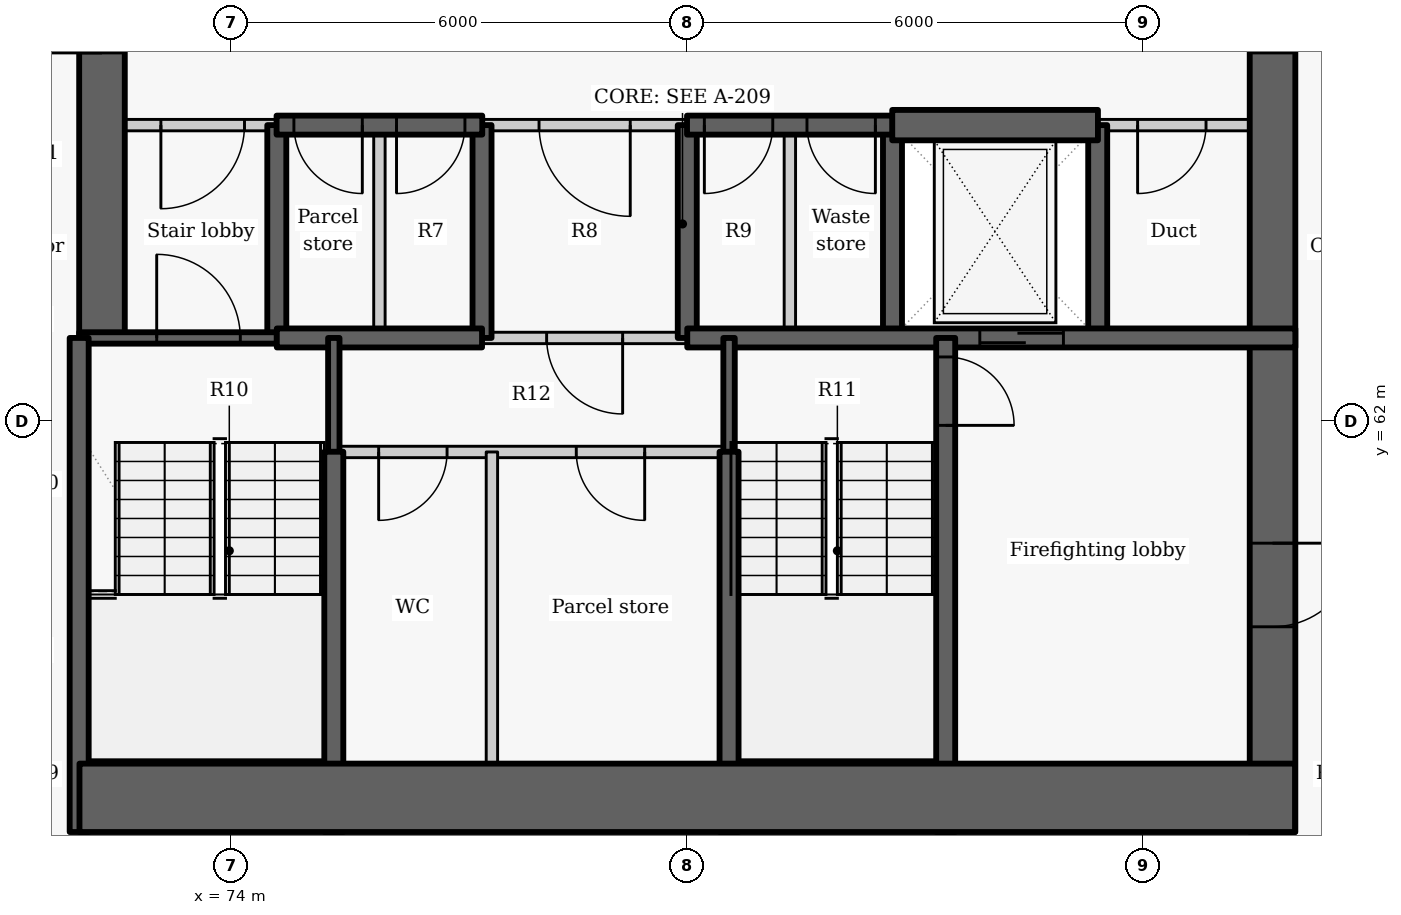
"""IFC4 building model, lengths in metres.
Left out: names, types, materials, properties, quantities, classifications, styles, units other than length and angle.
Written with IfcOpenShell. Run it as: python <this file> out.ifc"""

import sys

from ifc_helpers import new_model, si_unit, direction, frame, frame_2d, origin, place, context, subcontext, project, spatial, rectangle, extrude, element, fill, save


model = new_model("IFC4")
c1 = context("Model", 3, precision=1e-05, world=origin(), true_north=direction((0.0, 1.0)))
c2 = subcontext(c1, "Body", "Model", "MODEL_VIEW")
j1 = project(units=[si_unit("LENGTHUNIT", "METRE"), si_unit("PLANEANGLEUNIT", "RADIAN")], contexts=[c1])
p1 = place(None, origin())
s1 = spatial("IfcSite", under=j1, at=p1, CompositionType="ELEMENT")
p2 = place(p1, origin())
s2 = spatial("IfcBuilding", under=s1, at=p2, CompositionType="ELEMENT")
p3 = place(p2, frame((0.0, 0.0, 34.8)))
s3 = spatial("IfcBuildingStorey", under=s2, at=p3, CompositionType="ELEMENT", Elevation=34.8)
p4 = place(p3, frame((74.6, 63.1, -0.275), z_axis=(0.0, 0.0, 1.0), x_axis=(0.0, 1.0, 0.0)))
e1 = element("IfcWall", 1, at=p4, inside=s3, PredefinedType="SHEAR", context=c2, shape_type="SweptSolid", body=[
    extrude(rectangle(XDim=2.8, YDim=0.25, at=frame_2d((1.4, 0.0))), origin(), (0.0, 0.0, 1.0), 3.175),
])
p5 = place(p3, frame((72.3, 63.1, -0.275), z_axis=(0.0, 0.0, 1.0), x_axis=(0.0, 1.0, 0.0)))
e2 = element("IfcWall", 2, at=p5, inside=s3, PredefinedType="SHEAR", context=c2, shape_type="SweptSolid", body=[
    extrude(rectangle(XDim=9.1, YDim=0.6, at=frame_2d((4.55, 0.0))), origin(), (0.0, 0.0, 1.0), 3.175),
])
p6 = place(p5, frame((3.75, 0.0, 0.275)))
e3 = element("IfcOpeningElement", 3, at=p6, cuts=e2, PredefinedType="OPENING", context=c2, shape_type="SweptSolid", body=[
    extrude(rectangle(XDim=1.5, YDim=2.1, at=frame_2d((0.75, 1.05))), frame((0.0, 0.31, 0.0), z_axis=(0.0, -1.0, 0.0), x_axis=(1.0, 0.0, 0.0)), (0.0, 0.0, 1.0), 0.62),
])
for number, where, z_axis, x_axis in (
    (4, (77.3, 63.1, -0.275), (0.0, 0.0, 1.0), (0.0, 1.0, 0.0)),
    (5, (80.0, 63.1, -0.275), (0.0, 0.0, 1.0), (0.0, 1.0, 0.0)),
    (6, (82.7, 63.1, -0.275), (0.0, 0.0, 1.0), (0.0, 1.0, 0.0)),
    (7, (85.4, 63.1, -0.275), (0.0, 0.0, 1.0), (0.0, 1.0, 0.0)),
):
    element("IfcWall", number, at=place(p3, frame(where, z_axis=z_axis, x_axis=x_axis)), inside=s3, PredefinedType="SHEAR", context=c2, shape_type="SweptSolid", body=[
        extrude(rectangle(XDim=2.8, YDim=0.25, at=frame_2d((1.4, 0.0))), origin(), (0.0, 0.0, 1.0), 3.175),
    ])
p7 = place(p3, frame((87.7, 72.2, -0.275), z_axis=(0.0, 0.0, 1.0), x_axis=(0.0, -1.0, 0.0)))
e8 = element("IfcWall", 8, at=p7, inside=s3, PredefinedType="SHEAR", context=c2, shape_type="SweptSolid", body=[
    extrude(rectangle(XDim=15.6, YDim=0.6, at=frame_2d((7.8, 0.0))), origin(), (0.0, 0.0, 1.0), 3.175),
])
p8 = place(p7, frame((3.85, 0.0, 0.275)))
e9 = element("IfcOpeningElement", 9, at=p8, cuts=e8, PredefinedType="OPENING", context=c2, shape_type="SweptSolid", body=[
    extrude(rectangle(XDim=1.5, YDim=2.1, at=frame_2d((0.75, 1.05))), frame((0.0, 0.31, 0.0), z_axis=(0.0, -1.0, 0.0), x_axis=(1.0, 0.0, 0.0)), (0.0, 0.0, 1.0), 0.62),
])
p9 = place(p7, frame((11.8, 0.0, 0.275)))
e10 = element("IfcOpeningElement", 10, at=p9, cuts=e8, PredefinedType="OPENING", context=c2, shape_type="SweptSolid", body=[
    extrude(rectangle(XDim=1.1, YDim=2.1, at=frame_2d((0.55, 1.05))), frame((0.0, 0.31, 0.0), z_axis=(0.0, -1.0, 0.0), x_axis=(1.0, 0.0, 0.0)), (0.0, 0.0, 1.0), 0.62),
])
p10 = place(p3, frame((74.603, 65.9, 0.0), z_axis=(0.0, 0.0, 1.0), x_axis=(-1.0, 0.0, 0.0)))
e11 = element("IfcWall", 11, at=p10, inside=s3, PredefinedType="PARTITIONING", context=c2, shape_type="SweptSolid", body=[
    extrude(rectangle(XDim=2.603, YDim=0.15, at=frame_2d((1.302, 0.0))), origin(), (0.0, 0.0, 1.0), 2.9),
])
p11 = place(p10, frame((0.428, 0.0, 0.0)))
e12 = element("IfcOpeningElement", 12, at=p11, cuts=e11, PredefinedType="OPENING", context=c2, shape_type="SweptSolid", body=[
    extrude(rectangle(XDim=1.1, YDim=2.1, at=frame_2d((0.55, 1.05))), frame((0.0, 0.085, 0.0), z_axis=(0.0, -1.0, 0.0), x_axis=(1.0, 0.0, 0.0)), (0.0, 0.0, 1.0), 0.17),
])
p12 = place(p3, frame((80.003, 65.9, 0.0), z_axis=(0.0, 0.0, 1.0), x_axis=(-1.0, 0.0, 0.0)))
e13 = element("IfcWall", 13, at=p12, inside=s3, PredefinedType="PARTITIONING", context=c2, shape_type="SweptSolid", body=[
    extrude(rectangle(XDim=2.706, YDim=0.15, at=frame_2d((1.353, 0.0))), origin(), (0.0, 0.0, 1.0), 2.9),
])
p13 = place(p12, frame((0.753, 0.0, 0.0)))
e14 = element("IfcOpeningElement", 14, at=p13, cuts=e13, PredefinedType="OPENING", context=c2, shape_type="SweptSolid", body=[
    extrude(rectangle(XDim=1.2, YDim=2.1, at=frame_2d((0.6, 1.05))), frame((0.0, 0.085, 0.0), z_axis=(0.0, -1.0, 0.0), x_axis=(1.0, 0.0, 0.0)), (0.0, 0.0, 1.0), 0.17),
])
p14 = place(p3, frame((88.0, 65.9, 0.0), z_axis=(0.0, 0.0, 1.0), x_axis=(-1.0, 0.0, 0.0)))
e15 = element("IfcWall", 15, at=p14, inside=s3, PredefinedType="PARTITIONING", context=c2, shape_type="SweptSolid", body=[
    extrude(rectangle(XDim=2.603, YDim=0.15, at=frame_2d((1.302, 0.0))), origin(), (0.0, 0.0, 1.0), 2.9),
])
p15 = place(p14, frame((1.175, 0.0, 0.0)))
e16 = element("IfcOpeningElement", 16, at=p15, cuts=e15, PredefinedType="OPENING", context=c2, shape_type="SweptSolid", body=[
    extrude(rectangle(XDim=0.9, YDim=2.1, at=frame_2d((0.45, 1.05))), frame((0.0, 0.085, 0.0), z_axis=(0.0, -1.0, 0.0), x_axis=(1.0, 0.0, 0.0)), (0.0, 0.0, 1.0), 0.17),
])
p16 = place(p3, frame((77.303, 65.9, -0.275), z_axis=(0.0, 0.0, 1.0), x_axis=(-1.0, 0.0, 0.0)))
e17 = element("IfcWall", 17, at=p16, inside=s3, PredefinedType="SHEAR", context=c2, shape_type="SweptSolid", body=[
    extrude(rectangle(XDim=2.706, YDim=0.25, at=frame_2d((1.353, 0.0))), origin(), (0.0, 0.0, 1.0), 3.175),
])
p17 = place(p16, frame((1.578, 0.0, 0.275)))
e18 = element("IfcOpeningElement", 18, at=p17, cuts=e17, PredefinedType="OPENING", context=c2, shape_type="SweptSolid", body=[
    extrude(rectangle(XDim=0.9, YDim=2.1, at=frame_2d((0.45, 1.05))), frame((0.0, 0.135, 0.0), z_axis=(0.0, -1.0, 0.0), x_axis=(1.0, 0.0, 0.0)), (0.0, 0.0, 1.0), 0.27),
])
p18 = place(p16, frame((0.228, 0.0, 0.275)))
e19 = element("IfcOpeningElement", 19, at=p18, cuts=e17, PredefinedType="OPENING", context=c2, shape_type="SweptSolid", body=[
    extrude(rectangle(XDim=0.9, YDim=2.1, at=frame_2d((0.45, 1.05))), frame((0.0, 0.135, 0.0), z_axis=(0.0, -1.0, 0.0), x_axis=(1.0, 0.0, 0.0)), (0.0, 0.0, 1.0), 0.27),
])
p19 = place(p3, frame((82.703, 65.9, -0.275), z_axis=(0.0, 0.0, 1.0), x_axis=(-1.0, 0.0, 0.0)))
e20 = element("IfcWall", 20, at=p19, inside=s3, PredefinedType="SHEAR", context=c2, shape_type="SweptSolid", body=[
    extrude(rectangle(XDim=2.706, YDim=0.25, at=frame_2d((1.353, 0.0))), origin(), (0.0, 0.0, 1.0), 3.175),
])
p20 = place(p19, frame((1.578, 0.0, 0.275)))
e21 = element("IfcOpeningElement", 21, at=p20, cuts=e20, PredefinedType="OPENING", context=c2, shape_type="SweptSolid", body=[
    extrude(rectangle(XDim=0.9, YDim=2.1, at=frame_2d((0.45, 1.05))), frame((0.0, 0.135, 0.0), z_axis=(0.0, -1.0, 0.0), x_axis=(1.0, 0.0, 0.0)), (0.0, 0.0, 1.0), 0.27),
])
p21 = place(p19, frame((0.228, 0.0, 0.275)))
e22 = element("IfcOpeningElement", 22, at=p21, cuts=e20, PredefinedType="OPENING", context=c2, shape_type="SweptSolid", body=[
    extrude(rectangle(XDim=0.9, YDim=2.1, at=frame_2d((0.45, 1.05))), frame((0.0, 0.135, 0.0), z_axis=(0.0, -1.0, 0.0), x_axis=(1.0, 0.0, 0.0)), (0.0, 0.0, 1.0), 0.27),
])
p22 = place(p3, frame((82.697, 65.9, -0.275), z_axis=(0.0, 0.0, 1.0), x_axis=(1.0, 0.0, 0.0)))
e23 = element("IfcWall", 23, at=p22, inside=s3, PredefinedType="SHEAR", context=c2, shape_type="SweptSolid", body=[
    extrude(rectangle(XDim=2.706, YDim=0.4, at=frame_2d((1.353, 0.0))), origin(), (0.0, 0.0, 1.0), 3.175),
])
p23 = place(p3, frame((72.0, 63.1, -0.275), z_axis=(0.0, 0.0, 1.0), x_axis=(1.0, 0.0, 0.0)))
e24 = element("IfcWall", 24, at=p23, inside=s3, PredefinedType="SHEAR", context=c2, shape_type="SweptSolid", body=[
    extrude(rectangle(XDim=2.6, YDim=0.15, at=frame_2d((1.3, 0.0))), origin(), (0.0, 0.0, 1.0), 3.175),
])
p24 = place(p23, frame((1.02, 0.0, 0.275)))
e25 = element("IfcOpeningElement", 25, at=p24, cuts=e24, PredefinedType="OPENING", context=c2, shape_type="SweptSolid", body=[
    extrude(rectangle(XDim=1.1, YDim=2.1, at=frame_2d((0.55, 1.05))), frame((0.0, 0.085, 0.0), z_axis=(0.0, -1.0, 0.0), x_axis=(1.0, 0.0, 0.0)), (0.0, 0.0, 1.0), 0.17),
])
p25 = place(p3, frame((75.95, 63.1, 0.0), z_axis=(0.0, 0.0, 1.0), x_axis=(0.0, 1.0, 0.0)))
e26 = element("IfcWall", 26, at=p25, inside=s3, PredefinedType="PARTITIONING", context=c2, shape_type="SweptSolid", body=[
    extrude(rectangle(XDim=2.8, YDim=0.15, at=frame_2d((1.4, 0.0))), origin(), (0.0, 0.0, 1.0), 2.9),
])
p26 = place(p3, frame((74.6, 63.1, -0.275), z_axis=(0.0, 0.0, 1.0), x_axis=(1.0, 0.0, 0.0)))
e27 = element("IfcWall", 27, at=p26, inside=s3, PredefinedType="SHEAR", context=c2, shape_type="SweptSolid", body=[
    extrude(rectangle(XDim=2.7, YDim=0.25, at=frame_2d((1.35, 0.0))), origin(), (0.0, 0.0, 1.0), 3.175),
])
p27 = place(p3, frame((80.0, 63.1, -0.275), z_axis=(0.0, 0.0, 1.0), x_axis=(1.0, 0.0, 0.0)))
e28 = element("IfcWall", 28, at=p27, inside=s3, PredefinedType="SHEAR", context=c2, shape_type="SweptSolid", body=[
    extrude(rectangle(XDim=8.0, YDim=0.25, at=frame_2d((4.0, 0.0))), origin(), (0.0, 0.0, 1.0), 3.175),
])
p28 = place(p27, frame((3.849, 0.0, 0.275)))
e29 = element("IfcOpeningElement", 29, at=p28, cuts=e28, PredefinedType="OPENING", context=c2, shape_type="SweptSolid", body=[
    extrude(rectangle(XDim=1.1, YDim=2.1, at=frame_2d((0.55, 1.05))), frame((0.0, 0.135, 0.0), z_axis=(0.0, -1.0, 0.0), x_axis=(1.0, 0.0, 0.0)), (0.0, 0.0, 1.0), 0.27),
])
p29 = place(p3, frame((80.0, 63.1, 0.0), z_axis=(0.0, 0.0, 1.0), x_axis=(-1.0, 0.0, 0.0)))
e30 = element("IfcWall", 30, at=p29, inside=s3, PredefinedType="PARTITIONING", context=c2, shape_type="SweptSolid", body=[
    extrude(rectangle(XDim=2.7, YDim=0.15, at=frame_2d((1.35, 0.0))), origin(), (0.0, 0.0, 1.0), 2.9),
])
p30 = place(p29, frame((0.85, 0.0, 0.0)))
e31 = element("IfcOpeningElement", 31, at=p30, cuts=e30, PredefinedType="OPENING", context=c2, shape_type="SweptSolid", body=[
    extrude(rectangle(XDim=1.0, YDim=2.1, at=frame_2d((0.5, 1.05))), frame((0.0, 0.085, 0.0), z_axis=(0.0, -1.0, 0.0), x_axis=(1.0, 0.0, 0.0)), (0.0, 0.0, 1.0), 0.17),
])
p31 = place(p3, frame((81.35, 63.1, 0.0), z_axis=(0.0, 0.0, 1.0), x_axis=(0.0, 1.0, 0.0)))
e32 = element("IfcWall", 32, at=p31, inside=s3, PredefinedType="PARTITIONING", context=c2, shape_type="SweptSolid", body=[
    extrude(rectangle(XDim=2.8, YDim=0.15, at=frame_2d((1.4, 0.0))), origin(), (0.0, 0.0, 1.0), 2.9),
])
p32 = place(p3, frame((75.35, 61.597, -0.275), z_axis=(0.0, 0.0, 1.0), x_axis=(0.0, 1.0, 0.0)))
e33 = element("IfcWall", 33, at=p32, inside=s3, PredefinedType="SHEAR", context=c2, shape_type="SweptSolid", body=[
    extrude(rectangle(XDim=1.503, YDim=0.15, at=frame_2d((0.751, 0.0))), origin(), (0.0, 0.0, 1.0), 3.175),
])
p33 = place(p3, frame((75.35, 56.6, -0.275), z_axis=(0.0, 0.0, 1.0), x_axis=(0.0, 1.0, 0.0)))
e34 = element("IfcWall", 34, at=p33, inside=s3, PredefinedType="SHEAR", context=c2, shape_type="SweptSolid", body=[
    extrude(rectangle(XDim=5.003, YDim=0.25, at=frame_2d((2.501, 0.0))), origin(), (0.0, 0.0, 1.0), 3.175),
])
p34 = place(p3, frame((72.0, 56.6, -0.275), z_axis=(0.0, 0.0, 1.0), x_axis=(0.0, 1.0, 0.0)))
e35 = element("IfcWall", 35, at=p34, inside=s3, PredefinedType="SHEAR", context=c2, shape_type="SweptSolid", body=[
    extrude(rectangle(XDim=6.5, YDim=0.25, at=frame_2d((3.25, 0.0))), origin(), (0.0, 0.0, 1.0), 3.175),
])
p35 = place(p3, frame((83.4, 63.1, -0.275), z_axis=(0.0, 0.0, 1.0), x_axis=(0.0, -1.0, 0.0)))
e36 = element("IfcWall", 36, at=p35, inside=s3, PredefinedType="SHEAR", context=c2, shape_type="SweptSolid", body=[
    extrude(rectangle(XDim=6.5, YDim=0.25, at=frame_2d((3.25, 0.0))), origin(), (0.0, 0.0, 1.0), 3.175),
])
p36 = place(p35, frame((0.25, 0.0, 0.275)))
e37 = element("IfcOpeningElement", 37, at=p36, cuts=e36, PredefinedType="OPENING", context=c2, shape_type="SweptSolid", body=[
    extrude(rectangle(XDim=0.9, YDim=2.1, at=frame_2d((0.45, 1.05))), frame((0.0, 0.135, 0.0), z_axis=(0.0, -1.0, 0.0), x_axis=(1.0, 0.0, 0.0)), (0.0, 0.0, 1.0), 0.27),
])
p37 = place(p3, frame((80.55, 61.597, -0.275), z_axis=(0.0, 0.0, 1.0), x_axis=(0.0, 1.0, 0.0)))
e38 = element("IfcWall", 38, at=p37, inside=s3, PredefinedType="SHEAR", context=c2, shape_type="SweptSolid", body=[
    extrude(rectangle(XDim=1.503, YDim=0.15, at=frame_2d((0.751, 0.0))), origin(), (0.0, 0.0, 1.0), 3.175),
])
p38 = place(p3, frame((80.55, 56.6, -0.275), z_axis=(0.0, 0.0, 1.0), x_axis=(0.0, 1.0, 0.0)))
e39 = element("IfcWall", 39, at=p38, inside=s3, PredefinedType="SHEAR", context=c2, shape_type="SweptSolid", body=[
    extrude(rectangle(XDim=5.003, YDim=0.25, at=frame_2d((2.501, 0.0))), origin(), (0.0, 0.0, 1.0), 3.175),
])
p39 = place(p3, frame((80.55, 61.6, 0.0), z_axis=(0.0, 0.0, 1.0), x_axis=(-1.0, 0.0, 0.0)))
e40 = element("IfcWall", 40, at=p39, inside=s3, PredefinedType="PARTITIONING", context=c2, shape_type="SweptSolid", body=[
    extrude(rectangle(XDim=5.2, YDim=0.15, at=frame_2d((2.6, 0.0))), origin(), (0.0, 0.0, 1.0), 2.9),
])
p40 = place(p39, frame((3.71, 0.0, 0.0)))
e41 = element("IfcOpeningElement", 41, at=p40, cuts=e40, PredefinedType="OPENING", context=c2, shape_type="SweptSolid", body=[
    extrude(rectangle(XDim=0.9, YDim=2.1, at=frame_2d((0.45, 1.05))), frame((0.0, 0.085, 0.0), z_axis=(0.0, -1.0, 0.0), x_axis=(1.0, 0.0, 0.0)), (0.0, 0.0, 1.0), 0.17),
])
p41 = place(p39, frame((1.11, 0.0, 0.0)))
e42 = element("IfcOpeningElement", 42, at=p41, cuts=e40, PredefinedType="OPENING", context=c2, shape_type="SweptSolid", body=[
    extrude(rectangle(XDim=0.9, YDim=2.1, at=frame_2d((0.45, 1.05))), frame((0.0, 0.085, 0.0), z_axis=(0.0, -1.0, 0.0), x_axis=(1.0, 0.0, 0.0)), (0.0, 0.0, 1.0), 0.17),
])
p42 = place(p3, frame((77.43, 56.6, 0.0), z_axis=(0.0, 0.0, 1.0), x_axis=(0.0, 1.0, 0.0)))
e43 = element("IfcWall", 43, at=p42, inside=s3, PredefinedType="PARTITIONING", context=c2, shape_type="SweptSolid", body=[
    extrude(rectangle(XDim=5.0, YDim=0.15, at=frame_2d((2.5, 0.0))), origin(), (0.0, 0.0, 1.0), 2.9),
])
p43 = place(p3, frame((72.004, 57.05, -0.275), z_axis=(0.0, 0.0, 1.0), x_axis=(1.0, 0.0, 0.0)))
e44 = element("IfcWall", 44, at=p43, inside=s3, PredefinedType="SHEAR", context=c2, shape_type="SweptSolid", body=[
    extrude(rectangle(XDim=15.992, YDim=0.9, at=frame_2d((7.996, 0.0))), origin(), (0.0, 0.0, 1.0), 3.175),
])
p44 = place(p11, origin())
e45 = element("IfcDoor", 45, at=p44, inside=s3, OperationType="SINGLE_SWING_RIGHT", PredefinedType="DOOR", context=c2, shape_type="SweptSolid", body=[
    extrude(rectangle(XDim=1.1, YDim=2.1, at=frame_2d((0.55, 1.05))), frame((0.0, 0.025, 0.0), z_axis=(0.0, -1.0, 0.0), x_axis=(1.0, 0.0, 0.0)), (0.0, 0.0, 1.0), 0.05),
])
fill(e12, e45)
p45 = place(p17, origin())
e46 = element("IfcDoor", 46, at=p45, inside=s3, OperationType="SINGLE_SWING_LEFT", PredefinedType="DOOR", context=c2, shape_type="SweptSolid", body=[
    extrude(rectangle(XDim=0.9, YDim=2.1, at=frame_2d((0.45, 1.05))), frame((0.0, 0.025, 0.0), z_axis=(0.0, -1.0, 0.0), x_axis=(1.0, 0.0, 0.0)), (0.0, 0.0, 1.0), 0.05),
])
fill(e18, e46)
p46 = place(p18, origin())
e47 = element("IfcDoor", 47, at=p46, inside=s3, OperationType="SINGLE_SWING_RIGHT", PredefinedType="DOOR", context=c2, shape_type="SweptSolid", body=[
    extrude(rectangle(XDim=0.9, YDim=2.1, at=frame_2d((0.45, 1.05))), frame((0.0, 0.025, 0.0), z_axis=(0.0, -1.0, 0.0), x_axis=(1.0, 0.0, 0.0)), (0.0, 0.0, 1.0), 0.05),
])
fill(e19, e47)
p47 = place(p13, origin())
e48 = element("IfcDoor", 48, at=p47, inside=s3, OperationType="DOUBLE_DOOR_SINGLE_SWING", PredefinedType="DOOR", context=c2, shape_type="SweptSolid", body=[
    extrude(rectangle(XDim=1.2, YDim=2.1, at=frame_2d((0.6, 1.05))), frame((0.0, 0.025, 0.0), z_axis=(0.0, -1.0, 0.0), x_axis=(1.0, 0.0, 0.0)), (0.0, 0.0, 1.0), 0.05),
])
fill(e14, e48)
p48 = place(p20, origin())
e49 = element("IfcDoor", 49, at=p48, inside=s3, OperationType="SINGLE_SWING_RIGHT", PredefinedType="DOOR", context=c2, shape_type="SweptSolid", body=[
    extrude(rectangle(XDim=0.9, YDim=2.1, at=frame_2d((0.45, 1.05))), frame((0.0, 0.025, 0.0), z_axis=(0.0, -1.0, 0.0), x_axis=(1.0, 0.0, 0.0)), (0.0, 0.0, 1.0), 0.05),
])
fill(e21, e49)
p49 = place(p21, origin())
e50 = element("IfcDoor", 50, at=p49, inside=s3, OperationType="SINGLE_SWING_LEFT", PredefinedType="DOOR", context=c2, shape_type="SweptSolid", body=[
    extrude(rectangle(XDim=0.9, YDim=2.1, at=frame_2d((0.45, 1.05))), frame((0.0, 0.025, 0.0), z_axis=(0.0, -1.0, 0.0), x_axis=(1.0, 0.0, 0.0)), (0.0, 0.0, 1.0), 0.05),
])
fill(e22, e50)
p50 = place(p28, origin())
e51 = element("IfcDoor", 51, at=p50, inside=s3, OperationType="SLIDING_TO_LEFT", PredefinedType="DOOR", context=c2, shape_type="SweptSolid", body=[
    extrude(rectangle(XDim=1.1, YDim=2.1, at=frame_2d((0.55, 1.05))), frame((0.0, 0.025, 0.0), z_axis=(0.0, -1.0, 0.0), x_axis=(1.0, 0.0, 0.0)), (0.0, 0.0, 1.0), 0.05),
])
fill(e29, e51)
p51 = place(p15, origin())
e52 = element("IfcDoor", 52, at=p51, inside=s3, OperationType="SINGLE_SWING_RIGHT", PredefinedType="DOOR", context=c2, shape_type="SweptSolid", body=[
    extrude(rectangle(XDim=0.9, YDim=2.1, at=frame_2d((0.45, 1.05))), frame((0.0, 0.025, 0.0), z_axis=(0.0, -1.0, 0.0), x_axis=(1.0, 0.0, 0.0)), (0.0, 0.0, 1.0), 0.05),
])
fill(e16, e52)
p52 = place(p30, origin())
e53 = element("IfcDoor", 53, at=p52, inside=s3, OperationType="SINGLE_SWING_LEFT", PredefinedType="DOOR", context=c2, shape_type="SweptSolid", body=[
    extrude(rectangle(XDim=1.0, YDim=2.1, at=frame_2d((0.5, 1.05))), frame((0.0, 0.025, 0.0), z_axis=(0.0, -1.0, 0.0), x_axis=(1.0, 0.0, 0.0)), (0.0, 0.0, 1.0), 0.05),
])
fill(e31, e53)
p53 = place(p40, origin())
e54 = element("IfcDoor", 54, at=p53, inside=s3, OperationType="SINGLE_SWING_RIGHT", PredefinedType="DOOR", context=c2, shape_type="SweptSolid", body=[
    extrude(rectangle(XDim=0.9, YDim=2.1, at=frame_2d((0.45, 1.05))), frame((0.0, 0.025, 0.0), z_axis=(0.0, -1.0, 0.0), x_axis=(1.0, 0.0, 0.0)), (0.0, 0.0, 1.0), 0.05),
])
fill(e41, e54)
p54 = place(p41, origin())
e55 = element("IfcDoor", 55, at=p54, inside=s3, OperationType="SINGLE_SWING_LEFT", PredefinedType="DOOR", context=c2, shape_type="SweptSolid", body=[
    extrude(rectangle(XDim=0.9, YDim=2.1, at=frame_2d((0.45, 1.05))), frame((0.0, 0.025, 0.0), z_axis=(0.0, -1.0, 0.0), x_axis=(1.0, 0.0, 0.0)), (0.0, 0.0, 1.0), 0.05),
])
fill(e42, e55)
p55 = place(p24, origin())
e56 = element("IfcDoor", 56, at=p55, inside=s3, OperationType="SINGLE_SWING_LEFT", PredefinedType="DOOR", context=c2, shape_type="SweptSolid", body=[
    extrude(rectangle(XDim=1.1, YDim=2.1, at=frame_2d((0.55, 1.05))), frame((0.0, 0.025, 0.0), z_axis=(0.0, -1.0, 0.0), x_axis=(1.0, 0.0, 0.0)), (0.0, 0.0, 1.0), 0.05),
])
fill(e25, e56)
p56 = place(p36, origin())
e57 = element("IfcDoor", 57, at=p56, inside=s3, OperationType="SINGLE_SWING_RIGHT", PredefinedType="DOOR", context=c2, shape_type="SweptSolid", body=[
    extrude(rectangle(XDim=0.9, YDim=2.1, at=frame_2d((0.45, 1.05))), frame((0.0, 0.025, 0.0), z_axis=(0.0, -1.0, 0.0), x_axis=(1.0, 0.0, 0.0)), (0.0, 0.0, 1.0), 0.05),
])
fill(e37, e57)
p57 = place(p8, origin())
e58 = element("IfcDoor", 58, at=p57, inside=s3, OperationType="DOUBLE_DOOR_SINGLE_SWING", PredefinedType="DOOR", context=c2, shape_type="SweptSolid", body=[
    extrude(rectangle(XDim=1.5, YDim=2.1, at=frame_2d((0.75, 1.05))), frame((0.0, 0.025, 0.0), z_axis=(0.0, -1.0, 0.0), x_axis=(1.0, 0.0, 0.0)), (0.0, 0.0, 1.0), 0.05),
])
fill(e9, e58)
p58 = place(p9, origin())
e59 = element("IfcDoor", 59, at=p58, inside=s3, OperationType="SINGLE_SWING_LEFT", PredefinedType="DOOR", context=c2, shape_type="SweptSolid", body=[
    extrude(rectangle(XDim=1.1, YDim=2.1, at=frame_2d((0.55, 1.05))), frame((0.0, 0.025, 0.0), z_axis=(0.0, -1.0, 0.0), x_axis=(1.0, 0.0, 0.0)), (0.0, 0.0, 1.0), 0.05),
])
fill(e10, e59)
save(model, sys.argv[1])
